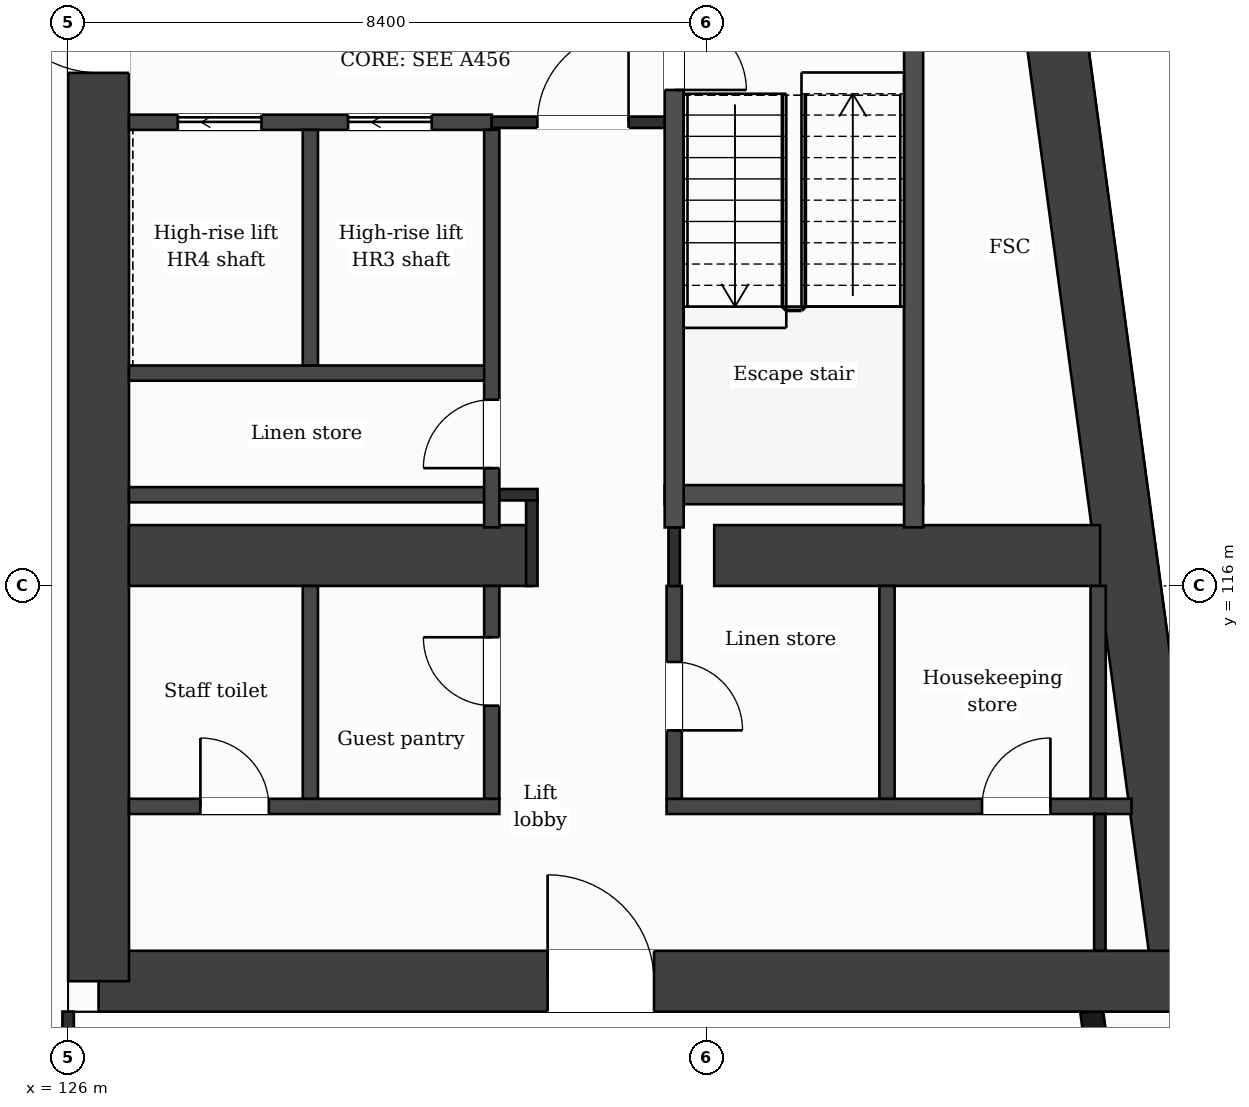
"""IFC4 building model, lengths in metres.
Left out: names, types, materials, properties, quantities, classifications, styles, units other than length and angle.
Written with IfcOpenShell. Run it as: python <this file> out.ifc"""

import sys

from ifc_helpers import new_model, si_unit, direction, frame, frame_2d, origin, place, context, subcontext, project, spatial, rectangle, extrude, element, fill, save


model = new_model("IFC4")
c1 = context("Model", 3, precision=1e-05, world=origin(), true_north=direction((0.0, 1.0)))
c2 = subcontext(c1, "Body", "Model", "MODEL_VIEW")
j1 = project(units=[si_unit("LENGTHUNIT", "METRE"), si_unit("PLANEANGLEUNIT", "RADIAN")], contexts=[c1])
p1 = place(None, origin())
s1 = spatial("IfcSite", under=j1, at=p1, CompositionType="ELEMENT")
p2 = place(p1, origin())
s2 = spatial("IfcBuilding", under=s1, at=p2, CompositionType="ELEMENT")
p3 = place(p2, frame((0.0, 0.0, 228.1)))
s3 = spatial("IfcBuildingStorey", under=s2, at=p3, CompositionType="ELEMENT", Elevation=228.1)
p4 = place(p3, frame((137.82, 132.0, 0.0), z_axis=(0.0, 0.0, 1.0), x_axis=(0.133408347329, -0.991061154956, 0.0)))
e1 = element("IfcWall", 1, at=p4, inside=s3, PredefinedType="SHEAR", context=c2, shape_type="SweptSolid", body=[
    extrude(rectangle(XDim=21.391, YDim=0.8, at=frame_2d((10.696, 0.0))), origin(), (0.0, 0.0, 1.0), 3.7),
])
p5 = place(p3, frame((140.673, 110.8, 0.0), z_axis=(0.0, 0.0, 1.0), x_axis=(-1.0, 0.0, 0.0)))
e2 = element("IfcWall", 2, at=p5, inside=s3, PredefinedType="SHEAR", context=c2, shape_type="SweptSolid", body=[
    extrude(rectangle(XDim=14.273, YDim=0.8, at=frame_2d((7.137, 0.0))), origin(), (0.0, 0.0, 1.0), 3.7),
])
p6 = place(p5, frame((6.965, 0.0, 0.0)))
e3 = element("IfcOpeningElement", 3, at=p6, cuts=e2, PredefinedType="OPENING", context=c2, shape_type="SweptSolid", body=[
    extrude(rectangle(XDim=1.4, YDim=2.1, at=frame_2d((0.7, 1.05))), frame((0.0, 0.41, 0.0), z_axis=(0.0, -1.0, 0.0), x_axis=(1.0, 0.0, 0.0)), (0.0, 0.0, 1.0), 0.82),
])
p7 = place(p3, frame((126.4, 110.8, 0.0), z_axis=(0.0, 0.0, 1.0), x_axis=(0.0, 1.0, 0.0)))
e4 = element("IfcWall", 4, at=p7, inside=s3, PredefinedType="SHEAR", context=c2, shape_type="SweptSolid", body=[
    extrude(rectangle(XDim=21.2, YDim=0.8, at=frame_2d((10.6, 0.0))), origin(), (0.0, 0.0, 1.0), 3.7),
])
p8 = place(p7, frame((11.95, 0.0, 0.0)))
e5 = element("IfcOpeningElement", 5, at=p8, cuts=e4, PredefinedType="OPENING", context=c2, shape_type="SweptSolid", body=[
    extrude(rectangle(XDim=1.4, YDim=2.1, at=frame_2d((0.7, 1.05))), frame((0.0, 0.41, 0.0), z_axis=(0.0, -1.0, 0.0), x_axis=(1.0, 0.0, 0.0)), (0.0, 0.0, 1.0), 0.82),
])
p9 = place(p3, frame((126.8, 116.4, 0.0), z_axis=(0.0, 0.0, 1.0), x_axis=(1.0, 0.0, 0.0)))
e6 = element("IfcWall", 6, at=p9, inside=s3, PredefinedType="SHEAR", context=c2, shape_type="SweptSolid", body=[
    extrude(rectangle(XDim=5.3, YDim=0.8, at=frame_2d((2.65, 0.0))), origin(), (0.0, 0.0, 1.0), 3.7),
])
p10 = place(p3, frame((134.5, 116.4, 0.0), z_axis=(0.0, 0.0, 1.0), x_axis=(1.0, 0.0, 0.0)))
e7 = element("IfcWall", 7, at=p10, inside=s3, PredefinedType="SHEAR", context=c2, shape_type="SweptSolid", body=[
    extrude(rectangle(XDim=5.077, YDim=0.8, at=frame_2d((2.539, 0.0))), origin(), (0.0, 0.0, 1.0), 3.7),
])
p11 = place(p3, frame((140.348, 103.85, 0.0), z_axis=(0.0, 0.0, 1.0), x_axis=(-0.133431549479, 0.991058031401, 0.0)))
e8 = element("IfcWall", 8, at=p11, inside=s3, PredefinedType="SOLIDWALL", context=c2, shape_type="SweptSolid", body=[
    extrude(rectangle(XDim=6.609, YDim=0.3, at=frame_2d((3.304, 0.0))), origin(), (0.0, 0.0, 1.0), 3.38),
])
p12 = place(p11, frame((0.737, 0.0, 0.9)))
e9 = element("IfcOpeningElement", 9, at=p12, cuts=e8, PredefinedType="OPENING", context=c2, shape_type="SweptSolid", body=[
    extrude(rectangle(XDim=1.2, YDim=2.1, at=frame_2d((0.6, 1.05))), frame((0.0, 0.16, 0.0), z_axis=(0.0, -1.0, 0.0), x_axis=(1.0, 0.0, 0.0)), (0.0, 0.0, 1.0), 0.32),
])
p13 = place(p11, frame((3.991, 0.0, 0.0)))
e10 = element("IfcOpeningElement", 10, at=p13, cuts=e8, PredefinedType="OPENING", context=c2, shape_type="SweptSolid", body=[
    extrude(rectangle(XDim=1.2, YDim=2.4, at=frame_2d((0.6, 1.2))), frame((0.0, 0.16, 0.0), z_axis=(0.0, -1.0, 0.0), x_axis=(1.0, 0.0, 0.0)), (0.0, 0.0, 1.0), 0.32),
])
p14 = place(p3, frame((126.8, 113.1, 0.0), z_axis=(0.0, 0.0, 1.0), x_axis=(1.0, 0.0, 0.0)))
e11 = element("IfcWall", 11, at=p14, inside=s3, PredefinedType="PARTITIONING", context=c2, shape_type="SweptSolid", body=[
    extrude(rectangle(XDim=4.873, YDim=0.2, at=frame_2d((2.437, 0.0))), origin(), (0.0, 0.0, 1.0), 3.38),
])
p15 = place(p14, frame((0.94, 0.0, 0.0)))
e12 = element("IfcOpeningElement", 12, at=p15, cuts=e11, PredefinedType="OPENING", context=c2, shape_type="SweptSolid", body=[
    extrude(rectangle(XDim=0.9, YDim=2.1, at=frame_2d((0.45, 1.05))), frame((0.0, 0.11, 0.0), z_axis=(0.0, -1.0, 0.0), x_axis=(1.0, 0.0, 0.0)), (0.0, 0.0, 1.0), 0.22),
])
p16 = place(p3, frame((133.873, 113.1, 0.0), z_axis=(0.0, 0.0, 1.0), x_axis=(1.0, 0.0, 0.0)))
e13 = element("IfcWall", 13, at=p16, inside=s3, PredefinedType="PARTITIONING", context=c2, shape_type="SweptSolid", body=[
    extrude(rectangle(XDim=6.117, YDim=0.2, at=frame_2d((3.059, 0.0))), origin(), (0.0, 0.0, 1.0), 3.38),
])
p17 = place(p16, frame((4.15, 0.0, 0.0)))
e14 = element("IfcOpeningElement", 14, at=p17, cuts=e13, PredefinedType="OPENING", context=c2, shape_type="SweptSolid", body=[
    extrude(rectangle(XDim=0.9, YDim=2.1, at=frame_2d((0.45, 1.05))), frame((0.0, 0.11, 0.0), z_axis=(0.0, -1.0, 0.0), x_axis=(1.0, 0.0, 0.0)), (0.0, 0.0, 1.0), 0.22),
])
p18 = place(p3, frame((126.8, 117.2, 0.0), z_axis=(0.0, 0.0, 1.0), x_axis=(1.0, 0.0, 0.0)))
e15 = element("IfcWall", 15, at=p18, inside=s3, PredefinedType="PARTITIONING", context=c2, shape_type="SweptSolid", body=[
    extrude(rectangle(XDim=4.773, YDim=0.2, at=frame_2d((2.386, 0.0))), origin(), (0.0, 0.0, 1.0), 3.38),
])
p19 = place(p3, frame((131.573, 117.2, 0.0), z_axis=(0.0, 0.0, 1.0), x_axis=(1.0, 0.0, 0.0)))
e16 = element("IfcWall", 16, at=p19, inside=s3, PredefinedType="PARTITIONING", context=c2, shape_type="SweptSolid", body=[
    extrude(rectangle(XDim=0.602, YDim=0.15, at=frame_2d((0.301, 0.0))), origin(), (0.0, 0.0, 1.0), 3.38),
])
p20 = place(p3, frame((133.848, 117.2, 0.0), z_axis=(0.0, 0.0, 1.0), x_axis=(1.0, 0.0, 0.0)))
e17 = element("IfcWall", 17, at=p20, inside=s3, PredefinedType="PARTITIONING", context=c2, shape_type="SweptSolid", body=[
    extrude(rectangle(XDim=3.4, YDim=0.25, at=frame_2d((1.7, 0.0))), origin(), (0.0, 0.0, 1.0), 3.38),
])
p21 = place(p3, frame((126.8, 118.8, 0.0), z_axis=(0.0, 0.0, 1.0), x_axis=(1.0, 0.0, 0.0)))
e18 = element("IfcWall", 18, at=p21, inside=s3, PredefinedType="PARTITIONING", context=c2, shape_type="SweptSolid", body=[
    extrude(rectangle(XDim=4.773, YDim=0.2, at=frame_2d((2.386, 0.0))), origin(), (0.0, 0.0, 1.0), 3.38),
])
p22 = place(p3, frame((126.8, 122.1, 0.0), z_axis=(0.0, 0.0, 1.0), x_axis=(1.0, 0.0, 0.0)))
e19 = element("IfcWall", 19, at=p22, inside=s3, PredefinedType="PARTITIONING", context=c2, shape_type="SweptSolid", body=[
    extrude(rectangle(XDim=4.773, YDim=0.2, at=frame_2d((2.386, 0.0))), origin(), (0.0, 0.0, 1.0), 3.38),
])
p23 = place(p22, frame((2.883, 0.0, 0.0)))
e20 = element("IfcOpeningElement", 20, at=p23, cuts=e19, PredefinedType="OPENING", context=c2, shape_type="SweptSolid", body=[
    extrude(rectangle(XDim=1.1, YDim=2.1, at=frame_2d((0.55, 1.05))), frame((0.0, 0.11, 0.0), z_axis=(0.0, -1.0, 0.0), x_axis=(1.0, 0.0, 0.0)), (0.0, 0.0, 1.0), 0.22),
])
p24 = place(p22, frame((0.643, 0.0, 0.0)))
e21 = element("IfcOpeningElement", 21, at=p24, cuts=e19, PredefinedType="OPENING", context=c2, shape_type="SweptSolid", body=[
    extrude(rectangle(XDim=1.1, YDim=2.1, at=frame_2d((0.55, 1.05))), frame((0.0, 0.11, 0.0), z_axis=(0.0, -1.0, 0.0), x_axis=(1.0, 0.0, 0.0)), (0.0, 0.0, 1.0), 0.22),
])
p25 = place(p3, frame((131.573, 122.1, 0.0), z_axis=(0.0, 0.0, 1.0), x_axis=(1.0, 0.0, 0.0)))
e22 = element("IfcWall", 22, at=p25, inside=s3, PredefinedType="PARTITIONING", context=c2, shape_type="SweptSolid", body=[
    extrude(rectangle(XDim=2.4, YDim=0.15, at=frame_2d((1.2, 0.0))), origin(), (0.0, 0.0, 1.0), 3.38),
])
p26 = place(p25, frame((0.6, 0.0, 0.0)))
e23 = element("IfcOpeningElement", 23, at=p26, cuts=e22, PredefinedType="OPENING", context=c2, shape_type="SweptSolid", body=[
    extrude(rectangle(XDim=1.2, YDim=2.1, at=frame_2d((0.6, 1.05))), frame((0.0, 0.085, 0.0), z_axis=(0.0, -1.0, 0.0), x_axis=(1.0, 0.0, 0.0)), (0.0, 0.0, 1.0), 0.17),
])
p27 = place(p3, frame((126.0, 109.075, 0.0), z_axis=(0.0, 0.0, 1.0), x_axis=(0.0, 1.0, 0.0)))
e24 = element("IfcWall", 24, at=p27, inside=s3, PredefinedType="PARTITIONING", context=c2, shape_type="SweptSolid", body=[
    extrude(rectangle(XDim=1.325, YDim=0.15, at=frame_2d((0.663, 0.0))), origin(), (0.0, 0.0, 1.0), 3.38),
])
p28 = place(p3, frame((129.187, 113.2, 0.0), z_axis=(0.0, 0.0, 1.0), x_axis=(0.0, 1.0, 0.0)))
e25 = element("IfcWall", 25, at=p28, inside=s3, PredefinedType="PARTITIONING", context=c2, shape_type="SweptSolid", body=[
    extrude(rectangle(XDim=2.8, YDim=0.2, at=frame_2d((1.4, 0.0))), origin(), (0.0, 0.0, 1.0), 3.38),
])
p29 = place(p3, frame((129.187, 118.9, 0.0), z_axis=(0.0, 0.0, 1.0), x_axis=(0.0, 1.0, 0.0)))
e26 = element("IfcWall", 26, at=p29, inside=s3, PredefinedType="PARTITIONING", context=c2, shape_type="SweptSolid", body=[
    extrude(rectangle(XDim=3.1, YDim=0.2, at=frame_2d((1.55, 0.0))), origin(), (0.0, 0.0, 1.0), 3.38),
])
p30 = place(p3, frame((131.573, 113.2, 0.0), z_axis=(0.0, 0.0, 1.0), x_axis=(0.0, 1.0, 0.0)))
e27 = element("IfcWall", 27, at=p30, inside=s3, PredefinedType="PARTITIONING", context=c2, shape_type="SweptSolid", body=[
    extrude(rectangle(XDim=2.8, YDim=0.2, at=frame_2d((1.4, 0.0))), origin(), (0.0, 0.0, 1.0), 3.38),
])
p31 = place(p30, frame((1.225, 0.0, 0.0)))
e28 = element("IfcOpeningElement", 28, at=p31, cuts=e27, PredefinedType="OPENING", context=c2, shape_type="SweptSolid", body=[
    extrude(rectangle(XDim=0.9, YDim=2.1, at=frame_2d((0.45, 1.05))), frame((0.0, 0.11, 0.0), z_axis=(0.0, -1.0, 0.0), x_axis=(1.0, 0.0, 0.0)), (0.0, 0.0, 1.0), 0.22),
])
p32 = place(p3, frame((131.573, 116.77, 0.0), z_axis=(0.0, 0.0, 1.0), x_axis=(0.0, 1.0, 0.0)))
e29 = element("IfcWall", 29, at=p32, inside=s3, PredefinedType="PARTITIONING", context=c2, shape_type="SweptSolid", body=[
    extrude(rectangle(XDim=5.23, YDim=0.2, at=frame_2d((2.615, 0.0))), origin(), (0.0, 0.0, 1.0), 3.38),
])
p33 = place(p32, frame((0.78, 0.0, 0.0)))
e30 = element("IfcOpeningElement", 30, at=p33, cuts=e29, PredefinedType="OPENING", context=c2, shape_type="SweptSolid", body=[
    extrude(rectangle(XDim=0.9, YDim=2.1, at=frame_2d((0.45, 1.05))), frame((0.0, 0.11, 0.0), z_axis=(0.0, -1.0, 0.0), x_axis=(1.0, 0.0, 0.0)), (0.0, 0.0, 1.0), 0.22),
])
p34 = place(p3, frame((132.1, 116.0, 0.0), z_axis=(0.0, 0.0, 1.0), x_axis=(0.0, 1.0, 0.0)))
e31 = element("IfcWall", 31, at=p34, inside=s3, PredefinedType="PARTITIONING", context=c2, shape_type="SweptSolid", body=[
    extrude(rectangle(XDim=1.125, YDim=0.15, at=frame_2d((0.562, 0.0))), origin(), (0.0, 0.0, 1.0), 3.38),
])
p35 = place(p3, frame((133.973, 113.2, 0.0), z_axis=(0.0, 0.0, 1.0), x_axis=(0.0, 1.0, 0.0)))
e32 = element("IfcWall", 32, at=p35, inside=s3, PredefinedType="PARTITIONING", context=c2, shape_type="SweptSolid", body=[
    extrude(rectangle(XDim=2.8, YDim=0.2, at=frame_2d((1.4, 0.0))), origin(), (0.0, 0.0, 1.0), 3.38),
])
p36 = place(p35, frame((0.9, 0.0, 0.0)))
e33 = element("IfcOpeningElement", 33, at=p36, cuts=e32, PredefinedType="OPENING", context=c2, shape_type="SweptSolid", body=[
    extrude(rectangle(XDim=0.9, YDim=2.1, at=frame_2d((0.45, 1.05))), frame((0.0, 0.11, 0.0), z_axis=(0.0, -1.0, 0.0), x_axis=(1.0, 0.0, 0.0)), (0.0, 0.0, 1.0), 0.22),
])
p37 = place(p3, frame((133.973, 116.0, 0.0), z_axis=(0.0, 0.0, 1.0), x_axis=(0.0, 1.0, 0.0)))
e34 = element("IfcWall", 34, at=p37, inside=s3, PredefinedType="PARTITIONING", context=c2, shape_type="SweptSolid", body=[
    extrude(rectangle(XDim=0.77, YDim=0.15, at=frame_2d((0.385, 0.0))), origin(), (0.0, 0.0, 1.0), 3.38),
])
p38 = place(p3, frame((133.973, 116.77, 0.0), z_axis=(0.0, 0.0, 1.0), x_axis=(0.0, 1.0, 0.0)))
e35 = element("IfcWall", 35, at=p38, inside=s3, PredefinedType="PARTITIONING", context=c2, shape_type="SweptSolid", body=[
    extrude(rectangle(XDim=7.055, YDim=0.25, at=frame_2d((3.527, 0.0))), origin(), (0.0, 0.0, 1.0), 3.38),
])
p39 = place(p38, frame((5.755, 0.0, 0.0)))
e36 = element("IfcOpeningElement", 36, at=p39, cuts=e35, PredefinedType="OPENING", context=c2, shape_type="SweptSolid", body=[
    extrude(rectangle(XDim=0.95, YDim=2.1, at=frame_2d((0.475, 1.05))), frame((0.0, 0.135, 0.0), z_axis=(0.0, -1.0, 0.0), x_axis=(1.0, 0.0, 0.0)), (0.0, 0.0, 1.0), 0.27),
])
p40 = place(p3, frame((136.773, 113.2, 0.0), z_axis=(0.0, 0.0, 1.0), x_axis=(0.0, 1.0, 0.0)))
e37 = element("IfcWall", 37, at=p40, inside=s3, PredefinedType="PARTITIONING", context=c2, shape_type="SweptSolid", body=[
    extrude(rectangle(XDim=2.8, YDim=0.2, at=frame_2d((1.4, 0.0))), origin(), (0.0, 0.0, 1.0), 3.38),
])
p41 = place(p3, frame((137.123, 116.77, 0.0), z_axis=(0.0, 0.0, 1.0), x_axis=(0.0, 1.0, 0.0)))
e38 = element("IfcWall", 38, at=p41, inside=s3, PredefinedType="PARTITIONING", context=c2, shape_type="SweptSolid", body=[
    extrude(rectangle(XDim=7.055, YDim=0.25, at=frame_2d((3.527, 0.0))), origin(), (0.0, 0.0, 1.0), 3.38),
])
p42 = place(p3, frame((139.551, 113.2, 0.0), z_axis=(0.0, 0.0, 1.0), x_axis=(0.0, 1.0, 0.0)))
e39 = element("IfcWall", 39, at=p42, inside=s3, PredefinedType="PARTITIONING", context=c2, shape_type="SweptSolid", body=[
    extrude(rectangle(XDim=2.8, YDim=0.2, at=frame_2d((1.4, 0.0))), origin(), (0.0, 0.0, 1.0), 3.38),
])
p43 = place(p3, frame((139.573, 111.2, 0.0), z_axis=(0.0, 0.0, 1.0), x_axis=(0.0, 1.0, 0.0)))
e40 = element("IfcWall", 40, at=p43, inside=s3, PredefinedType="PARTITIONING", context=c2, shape_type="SweptSolid", body=[
    extrude(rectangle(XDim=1.8, YDim=0.15, at=frame_2d((0.9, 0.0))), origin(), (0.0, 0.0, 1.0), 3.38),
])
p44 = place(p26, origin())
e41 = element("IfcDoor", 41, at=p44, inside=s3, OperationType="SINGLE_SWING_RIGHT", PredefinedType="DOOR", context=c2, shape_type="SweptSolid", body=[
    extrude(rectangle(XDim=1.2, YDim=2.1, at=frame_2d((0.6, 1.05))), frame((0.0, 0.025, 0.0), z_axis=(0.0, -1.0, 0.0), x_axis=(1.0, 0.0, 0.0)), (0.0, 0.0, 1.0), 0.05),
])
fill(e23, e41)
p45 = place(p23, origin())
e42 = element("IfcDoor", 42, at=p45, inside=s3, OperationType="SLIDING_TO_LEFT", PredefinedType="DOOR", context=c2, shape_type="SweptSolid", body=[
    extrude(rectangle(XDim=1.1, YDim=2.1, at=frame_2d((0.55, 1.05))), frame((0.0, 0.025, 0.0), z_axis=(0.0, -1.0, 0.0), x_axis=(1.0, 0.0, 0.0)), (0.0, 0.0, 1.0), 0.05),
])
fill(e20, e42)
p46 = place(p24, origin())
e43 = element("IfcDoor", 43, at=p46, inside=s3, OperationType="SLIDING_TO_LEFT", PredefinedType="DOOR", context=c2, shape_type="SweptSolid", body=[
    extrude(rectangle(XDim=1.1, YDim=2.1, at=frame_2d((0.55, 1.05))), frame((0.0, 0.025, 0.0), z_axis=(0.0, -1.0, 0.0), x_axis=(1.0, 0.0, 0.0)), (0.0, 0.0, 1.0), 0.05),
])
fill(e21, e43)
p47 = place(p39, origin())
e44 = element("IfcDoor", 44, at=p47, inside=s3, OperationType="SINGLE_SWING_LEFT", PredefinedType="DOOR", context=c2, shape_type="SweptSolid", body=[
    extrude(rectangle(XDim=0.95, YDim=2.1, at=frame_2d((0.475, 1.05))), frame((0.0, 0.025, 0.0), z_axis=(0.0, -1.0, 0.0), x_axis=(1.0, 0.0, 0.0)), (0.0, 0.0, 1.0), 0.05),
])
fill(e36, e44)
p48 = place(p33, origin())
e45 = element("IfcDoor", 45, at=p48, inside=s3, OperationType="SINGLE_SWING_LEFT", PredefinedType="DOOR", context=c2, shape_type="SweptSolid", body=[
    extrude(rectangle(XDim=0.9, YDim=2.1, at=frame_2d((0.45, 1.05))), frame((0.0, 0.025, 0.0), z_axis=(0.0, -1.0, 0.0), x_axis=(1.0, 0.0, 0.0)), (0.0, 0.0, 1.0), 0.05),
])
fill(e30, e45)
p49 = place(p17, origin())
e46 = element("IfcDoor", 46, at=p49, inside=s3, OperationType="SINGLE_SWING_RIGHT", PredefinedType="DOOR", context=c2, shape_type="SweptSolid", body=[
    extrude(rectangle(XDim=0.9, YDim=2.1, at=frame_2d((0.45, 1.05))), frame((0.0, 0.025, 0.0), z_axis=(0.0, -1.0, 0.0), x_axis=(1.0, 0.0, 0.0)), (0.0, 0.0, 1.0), 0.05),
])
fill(e14, e46)
p50 = place(p36, origin())
e47 = element("IfcDoor", 47, at=p50, inside=s3, OperationType="SINGLE_SWING_LEFT", PredefinedType="DOOR", context=c2, shape_type="SweptSolid", body=[
    extrude(rectangle(XDim=0.9, YDim=2.1, at=frame_2d((0.45, 1.05))), frame((0.0, 0.025, 0.0), z_axis=(0.0, -1.0, 0.0), x_axis=(1.0, 0.0, 0.0)), (0.0, 0.0, 1.0), 0.05),
])
fill(e33, e47)
p51 = place(p31, origin())
e48 = element("IfcDoor", 48, at=p51, inside=s3, OperationType="SINGLE_SWING_RIGHT", PredefinedType="DOOR", context=c2, shape_type="SweptSolid", body=[
    extrude(rectangle(XDim=0.9, YDim=2.1, at=frame_2d((0.45, 1.05))), frame((0.0, 0.025, 0.0), z_axis=(0.0, -1.0, 0.0), x_axis=(1.0, 0.0, 0.0)), (0.0, 0.0, 1.0), 0.05),
])
fill(e28, e48)
p52 = place(p15, origin())
e49 = element("IfcDoor", 49, at=p52, inside=s3, OperationType="SINGLE_SWING_LEFT", PredefinedType="DOOR", context=c2, shape_type="SweptSolid", body=[
    extrude(rectangle(XDim=0.9, YDim=2.1, at=frame_2d((0.45, 1.05))), frame((0.0, 0.025, 0.0), z_axis=(0.0, -1.0, 0.0), x_axis=(1.0, 0.0, 0.0)), (0.0, 0.0, 1.0), 0.05),
])
fill(e12, e49)
p53 = place(p6, origin())
e50 = element("IfcDoor", 50, at=p53, inside=s3, OperationType="SINGLE_SWING_RIGHT", PredefinedType="DOOR", context=c2, shape_type="SweptSolid", body=[
    extrude(rectangle(XDim=1.4, YDim=2.1, at=frame_2d((0.7, 1.05))), frame((0.0, 0.025, 0.0), z_axis=(0.0, -1.0, 0.0), x_axis=(1.0, 0.0, 0.0)), (0.0, 0.0, 1.0), 0.05),
])
fill(e3, e50)
p54 = place(p8, origin())
e51 = element("IfcDoor", 51, at=p54, inside=s3, OperationType="SINGLE_SWING_RIGHT", PredefinedType="DOOR", context=c2, shape_type="SweptSolid", body=[
    extrude(rectangle(XDim=1.4, YDim=2.1, at=frame_2d((0.7, 1.05))), frame((0.0, 0.025, 0.0), z_axis=(0.0, -1.0, 0.0), x_axis=(1.0, 0.0, 0.0)), (0.0, 0.0, 1.0), 0.05),
])
fill(e5, e51)
save(model, sys.argv[1])
